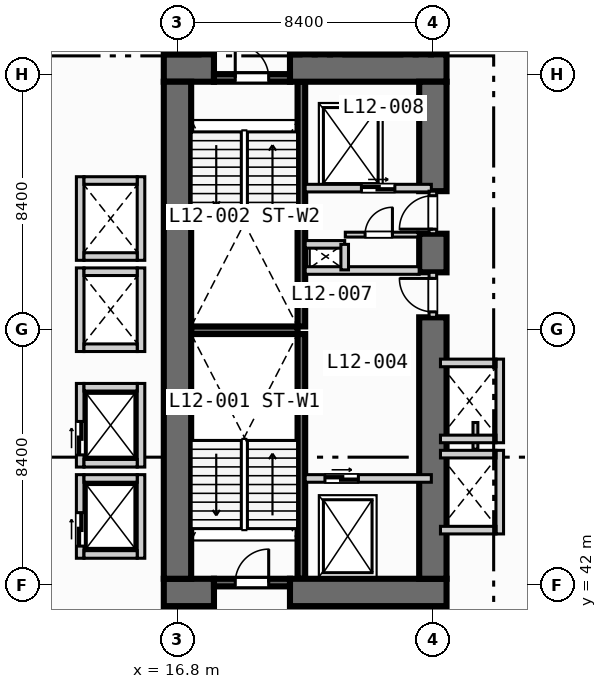
"""IFC4 building model, lengths in metres.
Left out: names, types, materials, properties, quantities, classifications, styles, units other than length and angle.
Written with IfcOpenShell. Run it as: python <this file> out.ifc"""

import sys

from ifc_helpers import new_model, si_unit, direction, frame, frame_2d, origin, place, context, subcontext, project, spatial, rectangle, extrude, element, fill, save


model = new_model("IFC4")
c1 = context("Model", 3, precision=1e-05, world=origin(), true_north=direction((0.0, 1.0)))
c2 = subcontext(c1, "Body", "Model", "MODEL_VIEW")
j1 = project(units=[si_unit("LENGTHUNIT", "METRE"), si_unit("PLANEANGLEUNIT", "RADIAN")], contexts=[c1])
p1 = place(None, origin())
s1 = spatial("IfcSite", under=j1, at=p1, CompositionType="ELEMENT")
p2 = place(p1, origin())
s2 = spatial("IfcBuilding", under=s1, at=p2, CompositionType="ELEMENT")
p3 = place(p2, frame((0.0, 0.0, 54.8)))
s3 = spatial("IfcBuildingStorey", under=s2, at=p3, CompositionType="ELEMENT", Elevation=54.8)
for number, where, z_axis, x_axis in (
    (1, (20.875, 42.2, 0.0), (0.0, 0.0, 1.0), (0.0, 1.0, 0.0)),
    (2, (20.875, 50.5, 0.0), (0.0, 0.0, 1.0), (0.0, 1.0, 0.0)),
):
    element("IfcWall", number, at=place(p3, frame(where, z_axis=z_axis, x_axis=x_axis)), inside=s3, PredefinedType="SOLIDWALL", context=c2, shape_type="SweptSolid", body=[
        extrude(rectangle(XDim=8.05, YDim=0.25, at=frame_2d((4.025, 0.0))), origin(), (0.0, 0.0, 1.0), 3.55),
    ])
p4 = place(p3, frame((17.25, 50.375, 0.0), z_axis=(0.0, 0.0, 1.0), x_axis=(1.0, 0.0, 0.0)))
e3 = element("IfcWall", 3, at=p4, inside=s3, PredefinedType="SOLIDWALL", context=c2, shape_type="SweptSolid", body=[
    extrude(rectangle(XDim=3.5, YDim=0.25, at=frame_2d((1.75, 0.0))), origin(), (0.0, 0.0, 1.0), 3.55),
])
p5 = place(p3, frame((16.35, 41.75, 0.0), z_axis=(0.0, 0.0, 1.0), x_axis=(1.0, 0.0, 0.0)))
e4 = element("IfcWall", 4, at=p5, inside=s3, PredefinedType="SHEAR", context=c2, shape_type="SweptSolid", body=[
    extrude(rectangle(XDim=1.65, YDim=0.9, at=frame_2d((0.825, 0.0))), origin(), (0.0, 0.0, 1.0), 3.55),
])
p6 = place(p3, frame((20.5, 41.75, 0.0), z_axis=(0.0, 0.0, 1.0), x_axis=(1.0, 0.0, 0.0)))
e5 = element("IfcWall", 5, at=p6, inside=s3, PredefinedType="SHEAR", context=c2, shape_type="SweptSolid", body=[
    extrude(rectangle(XDim=5.15, YDim=0.9, at=frame_2d((2.575, 0.0))), origin(), (0.0, 0.0, 1.0), 3.55),
])
p7 = place(p3, frame((16.35, 59.0, 0.0), z_axis=(0.0, 0.0, 1.0), x_axis=(1.0, 0.0, 0.0)))
e6 = element("IfcWall", 6, at=p7, inside=s3, PredefinedType="SHEAR", context=c2, shape_type="SweptSolid", body=[
    extrude(rectangle(XDim=1.65, YDim=0.9, at=frame_2d((0.825, 0.0))), origin(), (0.0, 0.0, 1.0), 3.55),
])
p8 = place(p3, frame((20.5, 59.0, 0.0), z_axis=(0.0, 0.0, 1.0), x_axis=(1.0, 0.0, 0.0)))
e7 = element("IfcWall", 7, at=p8, inside=s3, PredefinedType="SHEAR", context=c2, shape_type="SweptSolid", body=[
    extrude(rectangle(XDim=5.15, YDim=0.9, at=frame_2d((2.575, 0.0))), origin(), (0.0, 0.0, 1.0), 3.55),
])
p9 = place(p3, frame((16.8, 42.2, 0.0), z_axis=(0.0, 0.0, 1.0), x_axis=(0.0, 1.0, 0.0)))
e8 = element("IfcWall", 8, at=p9, inside=s3, PredefinedType="SHEAR", context=c2, shape_type="SweptSolid", body=[
    extrude(rectangle(XDim=16.35, YDim=0.9, at=frame_2d((8.175, 0.0))), origin(), (0.0, 0.0, 1.0), 3.55),
])
p10 = place(p3, frame((25.2, 42.2, 0.0), z_axis=(0.0, 0.0, 1.0), x_axis=(0.0, 1.0, 0.0)))
e9 = element("IfcWall", 9, at=p10, inside=s3, PredefinedType="SHEAR", context=c2, shape_type="SweptSolid", body=[
    extrude(rectangle(XDim=8.6, YDim=0.9, at=frame_2d((4.3, 0.0))), origin(), (0.0, 0.0, 1.0), 3.55),
])
p11 = place(p3, frame((25.2, 52.28, 0.0), z_axis=(0.0, 0.0, 1.0), x_axis=(0.0, 1.0, 0.0)))
e10 = element("IfcWall", 10, at=p11, inside=s3, PredefinedType="SHEAR", context=c2, shape_type="SweptSolid", body=[
    extrude(rectangle(XDim=1.27, YDim=0.9, at=frame_2d((0.635, 0.0))), origin(), (0.0, 0.0, 1.0), 3.55),
])
p12 = place(p3, frame((25.2, 54.95, 0.0), z_axis=(0.0, 0.0, 1.0), x_axis=(0.0, 1.0, 0.0)))
e11 = element("IfcWall", 11, at=p12, inside=s3, PredefinedType="SHEAR", context=c2, shape_type="SweptSolid", body=[
    extrude(rectangle(XDim=3.6, YDim=0.9, at=frame_2d((1.8, 0.0))), origin(), (0.0, 0.0, 1.0), 3.55),
])
p13 = place(p3, frame((18.0, 42.075, 0.0), z_axis=(0.0, 0.0, 1.0), x_axis=(1.0, 0.0, 0.0)))
e12 = element("IfcWall", 12, at=p13, inside=s3, PredefinedType="SOLIDWALL", context=c2, shape_type="SweptSolid", body=[
    extrude(rectangle(XDim=2.5, YDim=0.25, at=frame_2d((1.25, 0.0))), origin(), (0.0, 0.0, 1.0), 3.55),
])
p14 = place(p13, frame((0.7, 0.0, 0.0)))
e13 = element("IfcOpeningElement", 13, at=p14, cuts=e12, PredefinedType="OPENING", context=c2, shape_type="SweptSolid", body=[
    extrude(rectangle(XDim=1.1, YDim=2.15, at=frame_2d((0.55, 1.075))), frame((0.0, 0.135, 0.0), z_axis=(0.0, -1.0, 0.0), x_axis=(1.0, 0.0, 0.0)), (0.0, 0.0, 1.0), 0.27),
])
p15 = place(p3, frame((18.0, 58.675, 0.0), z_axis=(0.0, 0.0, 1.0), x_axis=(1.0, 0.0, 0.0)))
e14 = element("IfcWall", 14, at=p15, inside=s3, PredefinedType="SOLIDWALL", context=c2, shape_type="SweptSolid", body=[
    extrude(rectangle(XDim=2.5, YDim=0.25, at=frame_2d((1.25, 0.0))), origin(), (0.0, 0.0, 1.0), 3.55),
])
p16 = place(p15, frame((0.7, 0.0, 0.0)))
e15 = element("IfcOpeningElement", 15, at=p16, cuts=e14, PredefinedType="OPENING", context=c2, shape_type="SweptSolid", body=[
    extrude(rectangle(XDim=1.1, YDim=2.15, at=frame_2d((0.55, 1.075))), frame((0.0, 0.135, 0.0), z_axis=(0.0, -1.0, 0.0), x_axis=(1.0, 0.0, 0.0)), (0.0, 0.0, 1.0), 0.27),
])
p17 = place(p3, frame((21.0, 45.5, 0.0), z_axis=(0.0, 0.0, 1.0), x_axis=(1.0, 0.0, 0.0)))
e16 = element("IfcWall", 16, at=p17, inside=s3, PredefinedType="SOLIDWALL", context=c2, shape_type="SweptSolid", body=[
    extrude(rectangle(XDim=4.15, YDim=0.25, at=frame_2d((2.075, 0.0))), origin(), (0.0, 0.0, 1.0), 3.55),
])
p18 = place(p17, frame((0.65, 0.0, 0.0)))
e17 = element("IfcOpeningElement", 17, at=p18, cuts=e16, PredefinedType="OPENING", context=c2, shape_type="SweptSolid", body=[
    extrude(rectangle(XDim=1.1, YDim=2.15, at=frame_2d((0.55, 1.075))), frame((0.0, 0.135, 0.0), z_axis=(0.0, -1.0, 0.0), x_axis=(1.0, 0.0, 0.0)), (0.0, 0.0, 1.0), 0.27),
])
p19 = place(p3, frame((25.2, 50.8, 0.0), z_axis=(0.0, 0.0, 1.0), x_axis=(0.0, 1.0, 0.0)))
e18 = element("IfcWall", 18, at=p19, inside=s3, PredefinedType="SOLIDWALL", context=c2, shape_type="SweptSolid", body=[
    extrude(rectangle(XDim=1.48, YDim=0.25, at=frame_2d((0.74, 0.0))), origin(), (0.0, 0.0, 1.0), 3.55),
])
p20 = place(p19, frame((0.18, 0.0, 0.0)))
e19 = element("IfcOpeningElement", 19, at=p20, cuts=e18, PredefinedType="OPENING", context=c2, shape_type="SweptSolid", body=[
    extrude(rectangle(XDim=1.1, YDim=2.15, at=frame_2d((0.55, 1.075))), frame((0.0, 0.135, 0.0), z_axis=(0.0, -1.0, 0.0), x_axis=(1.0, 0.0, 0.0)), (0.0, 0.0, 1.0), 0.27),
])
p21 = place(p3, frame((21.0, 52.34, 0.0), z_axis=(0.0, 0.0, 1.0), x_axis=(1.0, 0.0, 0.0)))
e20 = element("IfcWall", 20, at=p21, inside=s3, PredefinedType="SOLIDWALL", context=c2, shape_type="SweptSolid", body=[
    extrude(rectangle(XDim=3.75, YDim=0.25, at=frame_2d((1.875, 0.0))), origin(), (0.0, 0.0, 1.0), 3.55),
])
p22 = place(p3, frame((21.0, 55.05, 0.0), z_axis=(0.0, 0.0, 1.0), x_axis=(1.0, 0.0, 0.0)))
e21 = element("IfcWall", 21, at=p22, inside=s3, PredefinedType="SOLIDWALL", context=c2, shape_type="SweptSolid", body=[
    extrude(rectangle(XDim=4.15, YDim=0.25, at=frame_2d((2.075, 0.0))), origin(), (0.0, 0.0, 1.0), 3.55),
])
p23 = place(p22, frame((1.85, 0.0, 0.0)))
e22 = element("IfcOpeningElement", 22, at=p23, cuts=e21, PredefinedType="OPENING", context=c2, shape_type="SweptSolid", body=[
    extrude(rectangle(XDim=1.1, YDim=2.15, at=frame_2d((0.55, 1.075))), frame((0.0, 0.135, 0.0), z_axis=(0.0, -1.0, 0.0), x_axis=(1.0, 0.0, 0.0)), (0.0, 0.0, 1.0), 0.27),
])
p24 = place(p3, frame((25.2, 53.55, 0.0), z_axis=(0.0, 0.0, 1.0), x_axis=(0.0, 1.0, 0.0)))
e23 = element("IfcWall", 23, at=p24, inside=s3, PredefinedType="SOLIDWALL", context=c2, shape_type="SweptSolid", body=[
    extrude(rectangle(XDim=1.4, YDim=0.25, at=frame_2d((0.7, 0.0))), origin(), (0.0, 0.0, 1.0), 3.55),
])
p25 = place(p24, frame((0.15, 0.0, 0.0)))
e24 = element("IfcOpeningElement", 24, at=p25, cuts=e23, PredefinedType="OPENING", context=c2, shape_type="SweptSolid", body=[
    extrude(rectangle(XDim=1.1, YDim=2.15, at=frame_2d((0.55, 1.075))), frame((0.0, 0.135, 0.0), z_axis=(0.0, -1.0, 0.0), x_axis=(1.0, 0.0, 0.0)), (0.0, 0.0, 1.0), 0.27),
])
p26 = place(p3, frame((21.0, 53.2, 0.0), z_axis=(0.0, 0.0, 1.0), x_axis=(1.0, 0.0, 0.0)))
e25 = element("IfcWall", 25, at=p26, inside=s3, PredefinedType="SOLIDWALL", context=c2, shape_type="SweptSolid", body=[
    extrude(rectangle(XDim=1.3, YDim=0.25, at=frame_2d((0.65, 0.0))), origin(), (0.0, 0.0, 1.0), 3.55),
])
p27 = place(p3, frame((22.3, 52.36, 0.0), z_axis=(0.0, 0.0, 1.0), x_axis=(0.0, 1.0, 0.0)))
e26 = element("IfcWall", 26, at=p27, inside=s3, PredefinedType="SOLIDWALL", context=c2, shape_type="SweptSolid", body=[
    extrude(rectangle(XDim=0.84, YDim=0.25, at=frame_2d((0.42, 0.0))), origin(), (0.0, 0.0, 1.0), 3.55),
])
p28 = place(p3, frame((22.32, 53.52, 0.0), z_axis=(0.0, 0.0, 1.0), x_axis=(1.0, 0.0, 0.0)))
e27 = element("IfcWall", 27, at=p28, inside=s3, PredefinedType="PARTITIONING", context=c2, shape_type="SweptSolid", body=[
    extrude(rectangle(XDim=2.4, YDim=0.16, at=frame_2d((1.2, 0.0))), origin(), (0.0, 0.0, 1.0), 3.55),
])
p29 = place(p28, frame((0.65, 0.0, 0.0)))
e28 = element("IfcOpeningElement", 28, at=p29, cuts=e27, PredefinedType="OPENING", context=c2, shape_type="SweptSolid", body=[
    extrude(rectangle(XDim=0.9, YDim=2.1, at=frame_2d((0.45, 1.05))), frame((0.0, 0.09, 0.0), z_axis=(0.0, -1.0, 0.0), x_axis=(1.0, 0.0, 0.0)), (0.0, 0.0, 1.0), 0.18),
])
p30 = place(p3, frame((13.6, 42.875, 0.0), z_axis=(0.0, 0.0, 1.0), x_axis=(0.0, 1.0, 0.0)))
e29 = element("IfcWall", 29, at=p30, inside=s3, PredefinedType="SOLIDWALL", context=c2, shape_type="SweptSolid", body=[
    extrude(rectangle(XDim=2.75, YDim=0.25, at=frame_2d((1.375, 0.0))), origin(), (0.0, 0.0, 1.0), 3.55),
])
p31 = place(p30, frame((0.4, 0.0, 0.0)))
e30 = element("IfcOpeningElement", 30, at=p31, cuts=e29, PredefinedType="OPENING", context=c2, shape_type="SweptSolid", body=[
    extrude(rectangle(XDim=1.1, YDim=2.15, at=frame_2d((0.55, 1.075))), frame((0.0, 0.135, 0.0), z_axis=(0.0, -1.0, 0.0), x_axis=(1.0, 0.0, 0.0)), (0.0, 0.0, 1.0), 0.27),
])
p32 = place(p3, frame((15.6, 42.875, 0.0), z_axis=(0.0, 0.0, 1.0), x_axis=(0.0, 1.0, 0.0)))
e31 = element("IfcWall", 31, at=p32, inside=s3, PredefinedType="SOLIDWALL", context=c2, shape_type="SweptSolid", body=[
    extrude(rectangle(XDim=2.75, YDim=0.25, at=frame_2d((1.375, 0.0))), origin(), (0.0, 0.0, 1.0), 3.55),
])
for number, where, z_axis, x_axis in (
    (32, (13.725, 43.0, 0.0), (0.0, 0.0, 1.0), (1.0, 0.0, 0.0)),
    (33, (13.725, 45.5, 0.0), (0.0, 0.0, 1.0), (1.0, 0.0, 0.0)),
):
    element("IfcWall", number, at=place(p3, frame(where, z_axis=z_axis, x_axis=x_axis)), inside=s3, PredefinedType="SOLIDWALL", context=c2, shape_type="SweptSolid", body=[
        extrude(rectangle(XDim=1.75, YDim=0.25, at=frame_2d((0.875, 0.0))), origin(), (0.0, 0.0, 1.0), 3.55),
    ])
p33 = place(p3, frame((13.6, 45.875, 0.0), z_axis=(0.0, 0.0, 1.0), x_axis=(0.0, 1.0, 0.0)))
e34 = element("IfcWall", 34, at=p33, inside=s3, PredefinedType="SOLIDWALL", context=c2, shape_type="SweptSolid", body=[
    extrude(rectangle(XDim=2.75, YDim=0.25, at=frame_2d((1.375, 0.0))), origin(), (0.0, 0.0, 1.0), 3.55),
])
p34 = place(p33, frame((0.4, 0.0, 0.0)))
e35 = element("IfcOpeningElement", 35, at=p34, cuts=e34, PredefinedType="OPENING", context=c2, shape_type="SweptSolid", body=[
    extrude(rectangle(XDim=1.1, YDim=2.15, at=frame_2d((0.55, 1.075))), frame((0.0, 0.135, 0.0), z_axis=(0.0, -1.0, 0.0), x_axis=(1.0, 0.0, 0.0)), (0.0, 0.0, 1.0), 0.27),
])
p35 = place(p3, frame((15.6, 45.875, 0.0), z_axis=(0.0, 0.0, 1.0), x_axis=(0.0, 1.0, 0.0)))
e36 = element("IfcWall", 36, at=p35, inside=s3, PredefinedType="SOLIDWALL", context=c2, shape_type="SweptSolid", body=[
    extrude(rectangle(XDim=2.75, YDim=0.25, at=frame_2d((1.375, 0.0))), origin(), (0.0, 0.0, 1.0), 3.55),
])
for number, where, z_axis, x_axis in (
    (37, (13.725, 46.0, 0.0), (0.0, 0.0, 1.0), (1.0, 0.0, 0.0)),
    (38, (13.725, 48.5, 0.0), (0.0, 0.0, 1.0), (1.0, 0.0, 0.0)),
):
    element("IfcWall", number, at=place(p3, frame(where, z_axis=z_axis, x_axis=x_axis)), inside=s3, PredefinedType="SOLIDWALL", context=c2, shape_type="SweptSolid", body=[
        extrude(rectangle(XDim=1.75, YDim=0.25, at=frame_2d((0.875, 0.0))), origin(), (0.0, 0.0, 1.0), 3.55),
    ])
for number, where, z_axis, x_axis in (
    (39, (13.6, 49.675, 0.0), (0.0, 0.0, 1.0), (0.0, 1.0, 0.0)),
    (40, (15.6, 49.675, 0.0), (0.0, 0.0, 1.0), (0.0, 1.0, 0.0)),
):
    element("IfcWall", number, at=place(p3, frame(where, z_axis=z_axis, x_axis=x_axis)), inside=s3, PredefinedType="SOLIDWALL", context=c2, shape_type="SweptSolid", body=[
        extrude(rectangle(XDim=2.75, YDim=0.25, at=frame_2d((1.375, 0.0))), origin(), (0.0, 0.0, 1.0), 3.55),
    ])
for number, where, z_axis, x_axis in (
    (41, (13.725, 49.8, 0.0), (0.0, 0.0, 1.0), (1.0, 0.0, 0.0)),
    (42, (13.725, 52.3, 0.0), (0.0, 0.0, 1.0), (1.0, 0.0, 0.0)),
):
    element("IfcWall", number, at=place(p3, frame(where, z_axis=z_axis, x_axis=x_axis)), inside=s3, PredefinedType="SOLIDWALL", context=c2, shape_type="SweptSolid", body=[
        extrude(rectangle(XDim=1.75, YDim=0.25, at=frame_2d((0.875, 0.0))), origin(), (0.0, 0.0, 1.0), 3.55),
    ])
for number, where, z_axis, x_axis in (
    (43, (13.6, 52.675, 0.0), (0.0, 0.0, 1.0), (0.0, 1.0, 0.0)),
    (44, (15.6, 52.675, 0.0), (0.0, 0.0, 1.0), (0.0, 1.0, 0.0)),
):
    element("IfcWall", number, at=place(p3, frame(where, z_axis=z_axis, x_axis=x_axis)), inside=s3, PredefinedType="SOLIDWALL", context=c2, shape_type="SweptSolid", body=[
        extrude(rectangle(XDim=2.75, YDim=0.25, at=frame_2d((1.375, 0.0))), origin(), (0.0, 0.0, 1.0), 3.55),
    ])
for number, where, z_axis, x_axis in (
    (45, (13.725, 52.8, 0.0), (0.0, 0.0, 1.0), (1.0, 0.0, 0.0)),
    (46, (13.725, 55.3, 0.0), (0.0, 0.0, 1.0), (1.0, 0.0, 0.0)),
):
    element("IfcWall", number, at=place(p3, frame(where, z_axis=z_axis, x_axis=x_axis)), inside=s3, PredefinedType="SOLIDWALL", context=c2, shape_type="SweptSolid", body=[
        extrude(rectangle(XDim=1.75, YDim=0.25, at=frame_2d((0.875, 0.0))), origin(), (0.0, 0.0, 1.0), 3.55),
    ])
p36 = place(p3, frame((27.4, 43.675, 0.0), z_axis=(0.0, 0.0, 1.0), x_axis=(0.0, 1.0, 0.0)))
e47 = element("IfcWall", 47, at=p36, inside=s3, PredefinedType="SOLIDWALL", context=c2, shape_type="SweptSolid", body=[
    extrude(rectangle(XDim=2.75, YDim=0.25, at=frame_2d((1.375, 0.0))), origin(), (0.0, 0.0, 1.0), 3.55),
])
for number, where, z_axis, x_axis in (
    (48, (25.45, 43.8, 0.0), (0.0, 0.0, 1.0), (1.0, 0.0, 0.0)),
    (49, (25.45, 46.3, 0.0), (0.0, 0.0, 1.0), (1.0, 0.0, 0.0)),
):
    element("IfcWall", number, at=place(p3, frame(where, z_axis=z_axis, x_axis=x_axis)), inside=s3, PredefinedType="SOLIDWALL", context=c2, shape_type="SweptSolid", body=[
        extrude(rectangle(XDim=1.825, YDim=0.25, at=frame_2d((0.913, 0.0))), origin(), (0.0, 0.0, 1.0), 3.55),
    ])
p37 = place(p3, frame((26.6, 46.46, 0.0), z_axis=(0.0, 0.0, 1.0), x_axis=(0.0, 1.0, 0.0)))
e50 = element("IfcWall", 50, at=p37, inside=s3, PredefinedType="PARTITIONING", context=c2, shape_type="SweptSolid", body=[
    extrude(rectangle(XDim=0.88, YDim=0.16, at=frame_2d((0.44, 0.0))), origin(), (0.0, 0.0, 1.0), 3.55),
])
p38 = place(p3, frame((27.4, 46.675, 0.0), z_axis=(0.0, 0.0, 1.0), x_axis=(0.0, 1.0, 0.0)))
e51 = element("IfcWall", 51, at=p38, inside=s3, PredefinedType="SOLIDWALL", context=c2, shape_type="SweptSolid", body=[
    extrude(rectangle(XDim=2.75, YDim=0.25, at=frame_2d((1.375, 0.0))), origin(), (0.0, 0.0, 1.0), 3.55),
])
for number, where, z_axis, x_axis in (
    (52, (25.45, 46.8, 0.0), (0.0, 0.0, 1.0), (1.0, 0.0, 0.0)),
    (53, (25.45, 49.3, 0.0), (0.0, 0.0, 1.0), (1.0, 0.0, 0.0)),
):
    element("IfcWall", number, at=place(p3, frame(where, z_axis=z_axis, x_axis=x_axis)), inside=s3, PredefinedType="SOLIDWALL", context=c2, shape_type="SweptSolid", body=[
        extrude(rectangle(XDim=1.825, YDim=0.25, at=frame_2d((0.913, 0.0))), origin(), (0.0, 0.0, 1.0), 3.55),
    ])
p39 = place(p14, origin())
e54 = element("IfcDoor", 54, at=p39, inside=s3, OperationType="SINGLE_SWING_RIGHT", PredefinedType="DOOR", context=c2, shape_type="SweptSolid", body=[
    extrude(rectangle(XDim=1.1, YDim=2.15, at=frame_2d((0.55, 1.075))), frame((0.0, 0.025, 0.0), z_axis=(0.0, -1.0, 0.0), x_axis=(1.0, 0.0, 0.0)), (0.0, 0.0, 1.0), 0.05),
])
fill(e13, e54)
p40 = place(p16, origin())
e55 = element("IfcDoor", 55, at=p40, inside=s3, OperationType="SINGLE_SWING_LEFT", PredefinedType="DOOR", context=c2, shape_type="SweptSolid", body=[
    extrude(rectangle(XDim=1.1, YDim=2.15, at=frame_2d((0.55, 1.075))), frame((0.0, 0.025, 0.0), z_axis=(0.0, -1.0, 0.0), x_axis=(1.0, 0.0, 0.0)), (0.0, 0.0, 1.0), 0.05),
])
fill(e15, e55)
p41 = place(p18, origin())
e56 = element("IfcDoor", 56, at=p41, inside=s3, OperationType="SLIDING_TO_LEFT", PredefinedType="DOOR", context=c2, shape_type="SweptSolid", body=[
    extrude(rectangle(XDim=1.1, YDim=2.15, at=frame_2d((0.55, 1.075))), frame((0.0, 0.025, 0.0), z_axis=(0.0, -1.0, 0.0), x_axis=(1.0, 0.0, 0.0)), (0.0, 0.0, 1.0), 0.05),
])
fill(e17, e56)
p42 = place(p20, origin())
e57 = element("IfcDoor", 57, at=p42, inside=s3, OperationType="SINGLE_SWING_RIGHT", PredefinedType="DOOR", context=c2, shape_type="SweptSolid", body=[
    extrude(rectangle(XDim=1.1, YDim=2.15, at=frame_2d((0.55, 1.075))), frame((0.0, 0.025, 0.0), z_axis=(0.0, -1.0, 0.0), x_axis=(1.0, 0.0, 0.0)), (0.0, 0.0, 1.0), 0.05),
])
fill(e19, e57)
p43 = place(p23, origin())
e58 = element("IfcDoor", 58, at=p43, inside=s3, OperationType="SLIDING_TO_LEFT", PredefinedType="DOOR", context=c2, shape_type="SweptSolid", body=[
    extrude(rectangle(XDim=1.1, YDim=2.15, at=frame_2d((0.55, 1.075))), frame((0.0, 0.025, 0.0), z_axis=(0.0, -1.0, 0.0), x_axis=(1.0, 0.0, 0.0)), (0.0, 0.0, 1.0), 0.05),
])
fill(e22, e58)
p44 = place(p25, origin())
e59 = element("IfcDoor", 59, at=p44, inside=s3, OperationType="SINGLE_SWING_LEFT", PredefinedType="DOOR", context=c2, shape_type="SweptSolid", body=[
    extrude(rectangle(XDim=1.1, YDim=2.15, at=frame_2d((0.55, 1.075))), frame((0.0, 0.025, 0.0), z_axis=(0.0, -1.0, 0.0), x_axis=(1.0, 0.0, 0.0)), (0.0, 0.0, 1.0), 0.05),
])
fill(e24, e59)
p45 = place(p29, origin())
e60 = element("IfcDoor", 60, at=p45, inside=s3, OperationType="SINGLE_SWING_RIGHT", PredefinedType="DOOR", context=c2, shape_type="SweptSolid", body=[
    extrude(rectangle(XDim=0.9, YDim=2.1, at=frame_2d((0.45, 1.05))), frame((0.0, 0.025, 0.0), z_axis=(0.0, -1.0, 0.0), x_axis=(1.0, 0.0, 0.0)), (0.0, 0.0, 1.0), 0.05),
])
fill(e28, e60)
p46 = place(p31, origin())
e61 = element("IfcDoor", 61, at=p46, inside=s3, OperationType="SLIDING_TO_LEFT", PredefinedType="DOOR", context=c2, shape_type="SweptSolid", body=[
    extrude(rectangle(XDim=1.1, YDim=2.15, at=frame_2d((0.55, 1.075))), frame((0.0, 0.025, 0.0), z_axis=(0.0, -1.0, 0.0), x_axis=(1.0, 0.0, 0.0)), (0.0, 0.0, 1.0), 0.05),
])
fill(e30, e61)
p47 = place(p34, origin())
e62 = element("IfcDoor", 62, at=p47, inside=s3, OperationType="SLIDING_TO_LEFT", PredefinedType="DOOR", context=c2, shape_type="SweptSolid", body=[
    extrude(rectangle(XDim=1.1, YDim=2.15, at=frame_2d((0.55, 1.075))), frame((0.0, 0.025, 0.0), z_axis=(0.0, -1.0, 0.0), x_axis=(1.0, 0.0, 0.0)), (0.0, 0.0, 1.0), 0.05),
])
fill(e35, e62)
save(model, sys.argv[1])
